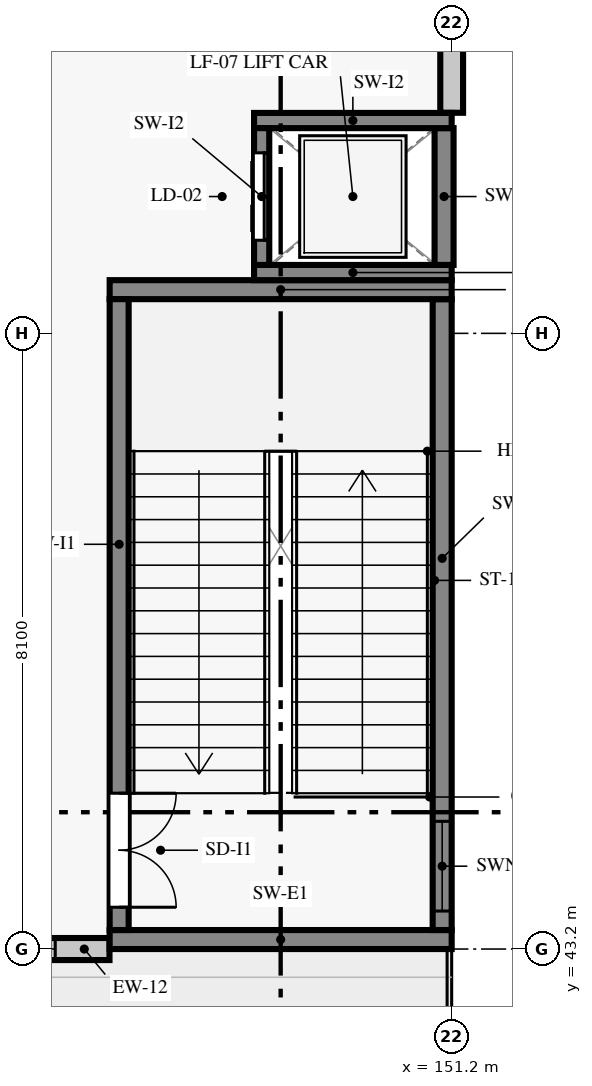
"""IFC4 building model, lengths in metres.
Left out: names, types, materials, properties, quantities, classifications, styles, units other than length and angle.
Written with IfcOpenShell. Run it as: python <this file> out.ifc"""

import sys

from ifc_helpers import new_model, si_unit, direction, frame, frame_2d, origin, place, context, subcontext, project, spatial, rectangle, extrude, element, fill, save


model = new_model("IFC4")
c1 = context("Model", 3, precision=1e-05, world=origin(), true_north=direction((0.0, 1.0)))
c2 = subcontext(c1, "Body", "Model", "MODEL_VIEW")
j1 = project(units=[si_unit("LENGTHUNIT", "METRE"), si_unit("PLANEANGLEUNIT", "RADIAN")], contexts=[c1])
p1 = place(None, origin())
s1 = spatial("IfcSite", under=j1, at=p1, CompositionType="ELEMENT")
p2 = place(p1, origin())
s2 = spatial("IfcBuilding", under=s1, at=p2, CompositionType="ELEMENT")
p3 = place(p2, frame((0.0, 0.0, 4.8)))
s3 = spatial("IfcBuildingStorey", under=s2, at=p3, CompositionType="ELEMENT", Elevation=4.8)
p4 = place(p3, frame((144.32, 43.2, 0.0), z_axis=(0.0, 0.0, 1.0), x_axis=(1.0, 0.0, 0.0)))
e1 = element("IfcWall", 1, at=p4, inside=s3, PredefinedType="STANDARD", context=c2, shape_type="SweptSolid", body=[
    extrude(rectangle(XDim=2.378, YDim=0.29, at=frame_2d((1.189, 0.0))), origin(), (0.0, 0.0, 1.0), 4.56),
])
p5 = place(p4, frame((0.714, 0.0, 0.9)))
e2 = element("IfcOpeningElement", 2, at=p5, cuts=e1, PredefinedType="OPENING", context=c2, shape_type="SweptSolid", body=[
    extrude(rectangle(XDim=0.95, YDim=1.3, at=frame_2d((0.475, 0.65))), frame((0.0, 0.155, 0.0), z_axis=(0.0, -1.0, 0.0), x_axis=(1.0, 0.0, 0.0)), (0.0, 0.0, 1.0), 0.31),
])
p6 = place(p3, frame((151.2, 54.202, 0.0), z_axis=(0.0, 0.0, 1.0), x_axis=(0.0, 1.0, 0.0)))
e3 = element("IfcWall", 3, at=p6, inside=s3, PredefinedType="STANDARD", context=c2, shape_type="SweptSolid", body=[
    extrude(rectangle(XDim=4.496, YDim=0.3, at=frame_2d((2.248, 0.0))), origin(), (0.0, 0.0, 1.0), 4.56),
])
p7 = place(p6, frame((1.198, 0.0, 0.9)))
e4 = element("IfcOpeningElement", 4, at=p7, cuts=e3, PredefinedType="OPENING", context=c2, shape_type="SweptSolid", body=[
    extrude(rectangle(XDim=2.1, YDim=1.66, at=frame_2d((1.05, 0.83))), frame((0.0, 0.16, 0.0), z_axis=(0.0, -1.0, 0.0), x_axis=(1.0, 0.0, 0.0)), (0.0, 0.0, 1.0), 0.32),
])
p8 = place(p3, frame((146.7, 43.325, 0.0), z_axis=(0.0, 0.0, 1.0), x_axis=(1.0, 0.0, 0.0)))
e5 = element("IfcWall", 5, at=p8, inside=s3, PredefinedType="SHEAR", context=c2, shape_type="SweptSolid", body=[
    extrude(rectangle(XDim=4.5, YDim=0.25, at=frame_2d((2.25, 0.0))), origin(), (0.0, 0.0, 1.0), 4.56),
])
p9 = place(p3, frame((151.075, 43.45, 0.0), z_axis=(0.0, 0.0, 1.0), x_axis=(0.0, 1.0, 0.0)))
e6 = element("IfcWall", 6, at=p9, inside=s3, PredefinedType="SHEAR", context=c2, shape_type="SweptSolid", body=[
    extrude(rectangle(XDim=8.3, YDim=0.25, at=frame_2d((4.15, 0.0))), origin(), (0.0, 0.0, 1.0), 4.56),
])
p10 = place(p9, frame((0.25, 0.0, 0.92)))
e7 = element("IfcOpeningElement", 7, at=p10, cuts=e6, PredefinedType="OPENING", context=c2, shape_type="SweptSolid", body=[
    extrude(rectangle(XDim=1.18, YDim=1.48, at=frame_2d((0.59, 0.74))), frame((0.0, 0.135, 0.0), z_axis=(0.0, -1.0, 0.0), x_axis=(1.0, 0.0, 0.0)), (0.0, 0.0, 1.0), 0.27),
])
p11 = place(p3, frame((151.2, 51.875, 0.0), z_axis=(0.0, 0.0, 1.0), x_axis=(-1.0, 0.0, 0.0)))
e8 = element("IfcWall", 8, at=p11, inside=s3, PredefinedType="SHEAR", context=c2, shape_type="SweptSolid", body=[
    extrude(rectangle(XDim=4.5, YDim=0.25, at=frame_2d((2.25, 0.0))), origin(), (0.0, 0.0, 1.0), 4.56),
])
p12 = place(p3, frame((146.825, 51.75, 0.0), z_axis=(0.0, 0.0, 1.0), x_axis=(0.0, -1.0, 0.0)))
e9 = element("IfcWall", 9, at=p12, inside=s3, PredefinedType="SHEAR", context=c2, shape_type="SweptSolid", body=[
    extrude(rectangle(XDim=8.3, YDim=0.25, at=frame_2d((4.15, 0.0))), origin(), (0.0, 0.0, 1.0), 4.56),
])
p13 = place(p12, frame((6.5, 0.0, 0.0)))
e10 = element("IfcOpeningElement", 10, at=p13, cuts=e9, PredefinedType="OPENING", context=c2, shape_type="SweptSolid", body=[
    extrude(rectangle(XDim=1.5, YDim=2.15, at=frame_2d((0.75, 1.075))), frame((0.0, 0.135, 0.0), z_axis=(0.0, -1.0, 0.0), x_axis=(1.0, 0.0, 0.0)), (0.0, 0.0, 1.0), 0.27),
])
p14 = place(p3, frame((148.6, 52.1, 0.0), z_axis=(0.0, 0.0, 1.0), x_axis=(1.0, 0.0, 0.0)))
e11 = element("IfcWall", 11, at=p14, inside=s3, PredefinedType="SHEAR", context=c2, shape_type="SweptSolid", body=[
    extrude(rectangle(XDim=2.6, YDim=0.2, at=frame_2d((1.3, 0.0))), origin(), (0.0, 0.0, 1.0), 4.56),
])
p15 = place(p3, frame((151.1, 52.2, 0.0), z_axis=(0.0, 0.0, 1.0), x_axis=(0.0, 1.0, 0.0)))
e12 = element("IfcWall", 12, at=p15, inside=s3, PredefinedType="SHEAR", context=c2, shape_type="SweptSolid", body=[
    extrude(rectangle(XDim=1.8, YDim=0.25, at=frame_2d((0.9, 0.0))), origin(), (0.0, 0.0, 1.0), 4.56),
])
p16 = place(p3, frame((151.2, 54.1, 0.0), z_axis=(0.0, 0.0, 1.0), x_axis=(-1.0, 0.0, 0.0)))
e13 = element("IfcWall", 13, at=p16, inside=s3, PredefinedType="SHEAR", context=c2, shape_type="SweptSolid", body=[
    extrude(rectangle(XDim=2.6, YDim=0.2, at=frame_2d((1.3, 0.0))), origin(), (0.0, 0.0, 1.0), 4.56),
])
p17 = place(p3, frame((148.7, 54.0, 0.0), z_axis=(0.0, 0.0, 1.0), x_axis=(0.0, -1.0, 0.0)))
e14 = element("IfcWall", 14, at=p17, inside=s3, PredefinedType="SHEAR", context=c2, shape_type="SweptSolid", body=[
    extrude(rectangle(XDim=1.8, YDim=0.2, at=frame_2d((0.9, 0.0))), origin(), (0.0, 0.0, 1.0), 4.56),
])
p18 = place(p17, frame((0.325, 0.0, 0.0)))
e15 = element("IfcOpeningElement", 15, at=p18, cuts=e14, PredefinedType="OPENING", context=c2, shape_type="SweptSolid", body=[
    extrude(rectangle(XDim=1.15, YDim=2.15, at=frame_2d((0.575, 1.075))), frame((0.0, 0.11, 0.0), z_axis=(0.0, -1.0, 0.0), x_axis=(1.0, 0.0, 0.0)), (0.0, 0.0, 1.0), 0.22),
])
p19 = place(p5, origin())
e16 = element("IfcWindow", 16, at=p19, inside=s3, PartitioningType="SINGLE_PANEL", PredefinedType="WINDOW", context=c2, shape_type="SweptSolid", body=[
    extrude(rectangle(XDim=0.95, YDim=1.3, at=frame_2d((0.475, 0.65))), frame((0.0, 0.03, 0.0), z_axis=(0.0, -1.0, 0.0), x_axis=(1.0, 0.0, 0.0)), (0.0, 0.0, 1.0), 0.06),
])
fill(e2, e16)
p20 = place(p10, origin())
e17 = element("IfcWindow", 17, at=p20, inside=s3, PartitioningType="SINGLE_PANEL", PredefinedType="WINDOW", context=c2, shape_type="SweptSolid", body=[
    extrude(rectangle(XDim=1.18, YDim=1.48, at=frame_2d((0.59, 0.74))), frame((0.0, 0.03, 0.0), z_axis=(0.0, -1.0, 0.0), x_axis=(1.0, 0.0, 0.0)), (0.0, 0.0, 1.0), 0.06),
])
fill(e7, e17)
p21 = place(p13, origin())
e18 = element("IfcDoor", 18, at=p21, inside=s3, OperationType="DOUBLE_DOOR_SINGLE_SWING", PredefinedType="DOOR", context=c2, shape_type="SweptSolid", body=[
    extrude(rectangle(XDim=1.5, YDim=2.15, at=frame_2d((0.75, 1.075))), frame((0.0, 0.025, 0.0), z_axis=(0.0, -1.0, 0.0), x_axis=(1.0, 0.0, 0.0)), (0.0, 0.0, 1.0), 0.05),
])
fill(e10, e18)
p22 = place(p18, frame((1.15, 0.0, 0.0), z_axis=(0.0, 0.0, 1.0), x_axis=(-1.0, 0.0, 0.0)))
e19 = element("IfcDoor", 19, at=p22, inside=s3, OperationType="DOUBLE_DOOR_SLIDING", PredefinedType="DOOR", context=c2, shape_type="SweptSolid", body=[
    extrude(rectangle(XDim=1.15, YDim=2.15, at=frame_2d((0.575, 1.075))), frame((0.0, 0.025, 0.0), z_axis=(0.0, -1.0, 0.0), x_axis=(1.0, 0.0, 0.0)), (0.0, 0.0, 1.0), 0.05),
])
fill(e15, e19)
save(model, sys.argv[1])
